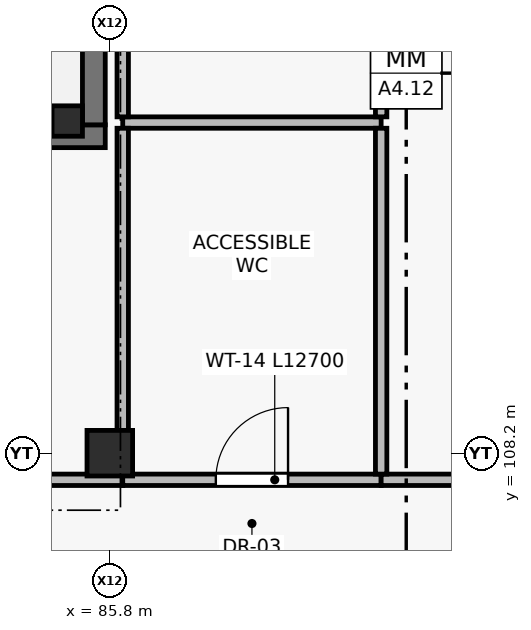
"""IFC4 building model, lengths in metres.
Left out: names, types, materials, properties, quantities, classifications, styles, units other than length and angle.
Written with IfcOpenShell. Run it as: python <this file> out.ifc"""

import sys

from ifc_helpers import new_model, si_unit, direction, frame, frame_2d, origin, origin_2d, place, context, subcontext, project, spatial, rectangle, extrude, element, fill, save


model = new_model("IFC4")
c1 = context("Model", 3, precision=1e-05, world=origin(), true_north=direction((0.0, 1.0)))
c2 = subcontext(c1, "Body", "Model", "MODEL_VIEW")
j1 = project(units=[si_unit("LENGTHUNIT", "METRE"), si_unit("PLANEANGLEUNIT", "RADIAN")], contexts=[c1])
p1 = place(None, origin())
s1 = spatial("IfcSite", under=j1, at=p1, CompositionType="ELEMENT")
p2 = place(p1, origin())
s2 = spatial("IfcBuilding", under=s1, at=p2, CompositionType="ELEMENT")
p3 = place(p2, frame((0.0, 0.0, 4.8)))
s3 = spatial("IfcBuildingStorey", under=s2, at=p3, CompositionType="ELEMENT", Elevation=4.8)
p4 = place(p3, frame((85.8, 108.2, 0.0), z_axis=(0.0, 0.0, 1.0), x_axis=(1.0, 0.0, 0.0)))
e1 = element("IfcColumn", 1, at=p4, inside=s3, PredefinedType="COLUMN", context=c2, shape_type="SweptSolid", body=[
    extrude(rectangle(XDim=0.6, YDim=0.6, at=origin_2d()), origin(), (0.0, 0.0, 1.0), 4.8),
])
p5 = place(p3, frame((85.24, 112.57, 0.0), z_axis=(0.0, 0.0, 1.0), x_axis=(1.0, 0.0, 0.0)))
e2 = element("IfcColumn", 2, at=p5, inside=s3, PredefinedType="COLUMN", context=c2, shape_type="SweptSolid", body=[
    extrude(rectangle(XDim=0.4, YDim=0.4, at=origin_2d()), origin(), (0.0, 0.0, 1.0), 4.8),
])
p6 = place(p3, frame((78.24, 112.37, 0.0), z_axis=(0.0, 0.0, 1.0), x_axis=(1.0, 0.0, 0.0)))
e3 = element("IfcWall", 3, at=p6, inside=s3, PredefinedType="SHEAR", context=c2, shape_type="SweptSolid", body=[
    extrude(rectangle(XDim=7.5, YDim=0.3, at=frame_2d((3.75, 0.0))), origin(), (0.0, 0.0, 1.0), 4.54),
])
p7 = place(p6, frame((0.5, 0.0, 0.0)))
e4 = element("IfcOpeningElement", 4, at=p7, cuts=e3, PredefinedType="OPENING", context=c2, shape_type="SweptSolid", body=[
    extrude(rectangle(XDim=1.4, YDim=2.2, at=frame_2d((0.7, 1.1))), frame((0.0, 0.16, 0.0), z_axis=(0.0, -1.0, 0.0), x_axis=(1.0, 0.0, 0.0)), (0.0, 0.0, 1.0), 0.32),
])
p8 = place(p3, frame((85.59, 112.52, 0.0), z_axis=(0.0, 0.0, 1.0), x_axis=(0.0, 1.0, 0.0)))
e5 = element("IfcWall", 5, at=p8, inside=s3, PredefinedType="SHEAR", context=c2, shape_type="SweptSolid", body=[
    extrude(rectangle(XDim=3.33, YDim=0.3, at=frame_2d((1.665, 0.0))), origin(), (0.0, 0.0, 1.0), 4.54),
])
p9 = place(p3, frame((81.62, 107.85, 0.0), z_axis=(0.0, 0.0, 1.0), x_axis=(1.0, 0.0, 0.0)))
e6 = element("IfcWall", 6, at=p9, inside=s3, PredefinedType="PARTITIONING", context=c2, shape_type="SweptSolid", body=[
    extrude(rectangle(XDim=4.35, YDim=0.15, at=frame_2d((2.175, 0.0))), origin(), (0.0, 0.0, 1.0), 4.04),
])
p10 = place(p9, frame((1.315, 0.0, 0.0)))
e7 = element("IfcOpeningElement", 7, at=p10, cuts=e6, PredefinedType="OPENING", context=c2, shape_type="SweptSolid", body=[
    extrude(rectangle(XDim=1.72, YDim=2.3, at=frame_2d((0.86, 1.15))), frame((0.0, 0.085, 0.0), z_axis=(0.0, -1.0, 0.0), x_axis=(1.0, 0.0, 0.0)), (0.0, 0.0, 1.0), 0.17),
])
p11 = place(p3, frame((85.97, 107.85, 0.0), z_axis=(0.0, 0.0, 1.0), x_axis=(1.0, 0.0, 0.0)))
e8 = element("IfcWall", 8, at=p11, inside=s3, PredefinedType="PARTITIONING", context=c2, shape_type="SweptSolid", body=[
    extrude(rectangle(XDim=3.4, YDim=0.15, at=frame_2d((1.7, 0.0))), origin(), (0.0, 0.0, 1.0), 4.04),
])
p12 = place(p11, frame((1.225, 0.0, 0.0)))
e9 = element("IfcOpeningElement", 9, at=p12, cuts=e8, PredefinedType="OPENING", context=c2, shape_type="SweptSolid", body=[
    extrude(rectangle(XDim=0.95, YDim=2.1, at=frame_2d((0.475, 1.05))), frame((0.0, 0.085, 0.0), z_axis=(0.0, -1.0, 0.0), x_axis=(1.0, 0.0, 0.0)), (0.0, 0.0, 1.0), 0.17),
])
p13 = place(p3, frame((85.97, 112.55, 0.0), z_axis=(0.0, 0.0, 1.0), x_axis=(1.0, 0.0, 0.0)))
e10 = element("IfcWall", 10, at=p13, inside=s3, PredefinedType="PARTITIONING", context=c2, shape_type="SweptSolid", body=[
    extrude(rectangle(XDim=3.4, YDim=0.15, at=frame_2d((1.7, 0.0))), origin(), (0.0, 0.0, 1.0), 4.54),
])
p14 = place(p3, frame((89.37, 107.85, 0.0), z_axis=(0.0, 0.0, 1.0), x_axis=(1.0, 0.0, 0.0)))
e11 = element("IfcWall", 11, at=p14, inside=s3, PredefinedType="PARTITIONING", context=c2, shape_type="SweptSolid", body=[
    extrude(rectangle(XDim=4.95, YDim=0.15, at=frame_2d((2.475, 0.0))), origin(), (0.0, 0.0, 1.0), 4.04),
])
p15 = place(p14, frame((1.975, 0.0, 0.0)))
e12 = element("IfcOpeningElement", 12, at=p15, cuts=e11, PredefinedType="OPENING", context=c2, shape_type="SweptSolid", body=[
    extrude(rectangle(XDim=1.0, YDim=2.1, at=frame_2d((0.5, 1.05))), frame((0.0, 0.085, 0.0), z_axis=(0.0, -1.0, 0.0), x_axis=(1.0, 0.0, 0.0)), (0.0, 0.0, 1.0), 0.17),
])
p16 = place(p3, frame((85.97, 108.5, 0.0), z_axis=(0.0, 0.0, 1.0), x_axis=(0.0, 1.0, 0.0)))
e13 = element("IfcWall", 13, at=p16, inside=s3, PredefinedType="PARTITIONING", context=c2, shape_type="SweptSolid", body=[
    extrude(rectangle(XDim=3.975, YDim=0.15, at=frame_2d((1.988, 0.0))), origin(), (0.0, 0.0, 1.0), 4.09),
])
p17 = place(p3, frame((85.97, 112.625, 0.0), z_axis=(0.0, 0.0, 1.0), x_axis=(0.0, 1.0, 0.0)))
e14 = element("IfcWall", 14, at=p17, inside=s3, PredefinedType="PARTITIONING", context=c2, shape_type="SweptSolid", body=[
    extrude(rectangle(XDim=3.075, YDim=0.15, at=frame_2d((1.538, 0.0))), origin(), (0.0, 0.0, 1.0), 4.09),
])
p18 = place(p3, frame((89.37, 107.925, 0.0), z_axis=(0.0, 0.0, 1.0), x_axis=(0.0, 1.0, 0.0)))
e15 = element("IfcWall", 15, at=p18, inside=s3, PredefinedType="PARTITIONING", context=c2, shape_type="SweptSolid", body=[
    extrude(rectangle(XDim=4.55, YDim=0.15, at=frame_2d((2.275, 0.0))), origin(), (0.0, 0.0, 1.0), 4.54),
])
p19 = place(p3, frame((89.37, 112.625, 0.0), z_axis=(0.0, 0.0, 1.0), x_axis=(0.0, 1.0, 0.0)))
e16 = element("IfcWall", 16, at=p19, inside=s3, PredefinedType="PARTITIONING", context=c2, shape_type="SweptSolid", body=[
    extrude(rectangle(XDim=3.205, YDim=0.15, at=frame_2d((1.603, 0.0))), origin(), (0.0, 0.0, 1.0), 4.54),
])
p20 = place(p12, origin())
e17 = element("IfcDoor", 17, at=p20, inside=s3, OperationType="SINGLE_SWING_RIGHT", PredefinedType="DOOR", context=c2, shape_type="SweptSolid", body=[
    extrude(rectangle(XDim=0.95, YDim=2.1, at=frame_2d((0.475, 1.05))), frame((0.0, 0.025, 0.0), z_axis=(0.0, -1.0, 0.0), x_axis=(1.0, 0.0, 0.0)), (0.0, 0.0, 1.0), 0.05),
])
fill(e9, e17)
save(model, sys.argv[1])
